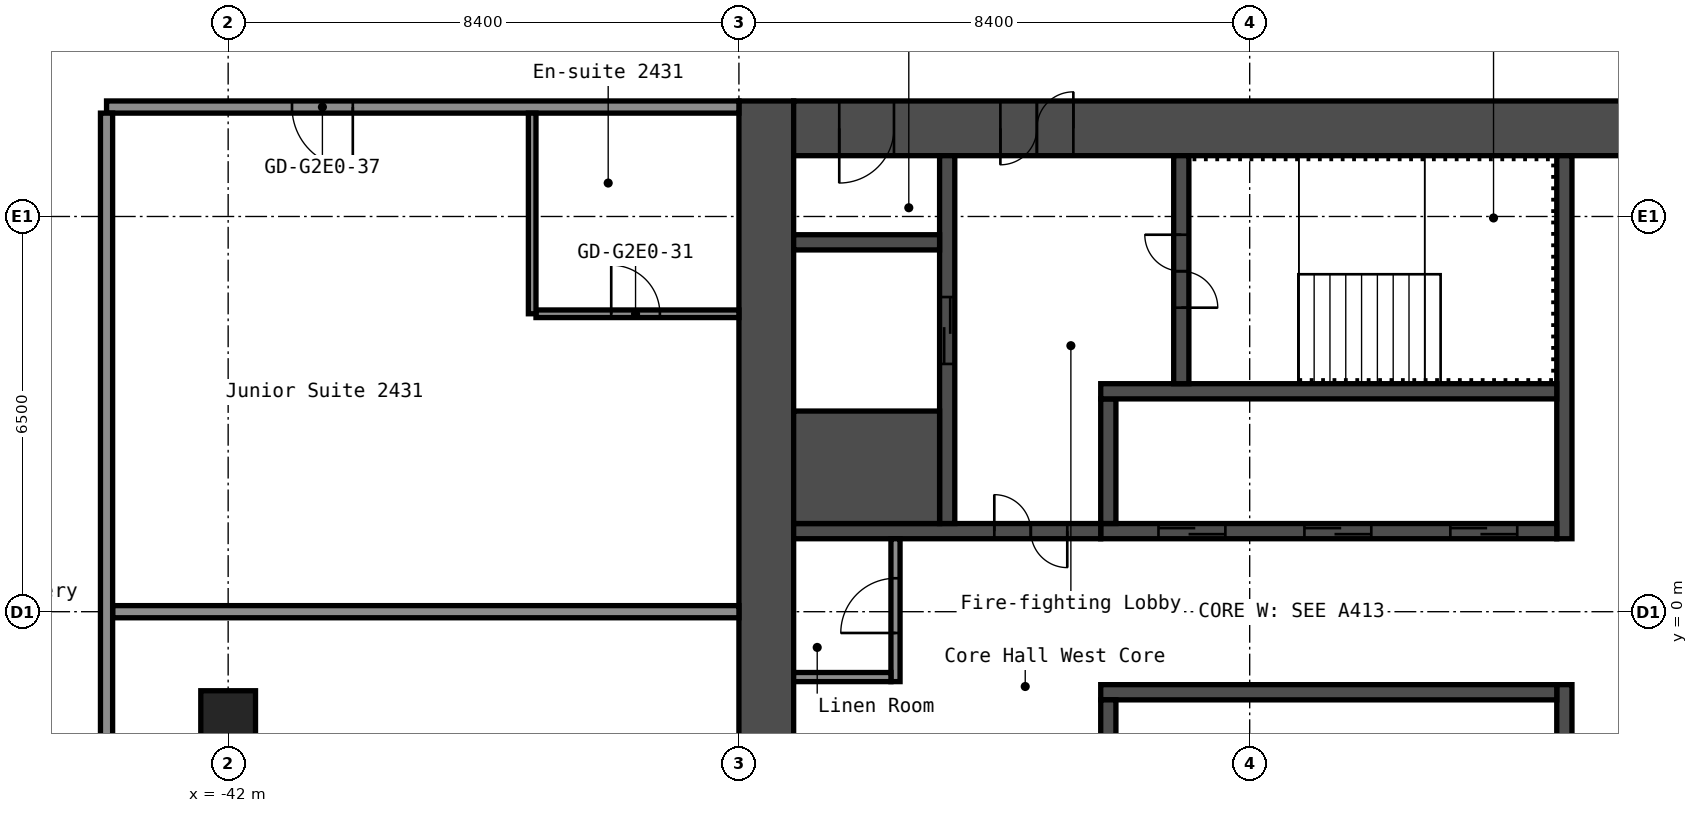
"""IFC4 building model, lengths in metres.
Left out: names, types, materials, properties, quantities, classifications, styles, units other than length and angle.
Written with IfcOpenShell. Run it as: python <this file> out.ifc"""

import sys

from ifc_helpers import new_model, si_unit, direction, frame, frame_2d, origin, origin_2d, place, context, subcontext, project, spatial, rectangle, hollow_rectangle, extrude, element, fill, save


model = new_model("IFC4")
c1 = context("Model", 3, precision=1e-05, world=origin(), true_north=direction((0.0, 1.0)))
c2 = subcontext(c1, "Body", "Model", "MODEL_VIEW")
j1 = project(units=[si_unit("LENGTHUNIT", "METRE"), si_unit("PLANEANGLEUNIT", "RADIAN")], contexts=[c1])
p1 = place(None, origin())
s1 = spatial("IfcSite", under=j1, at=p1, CompositionType="ELEMENT")
p2 = place(p1, origin())
s2 = spatial("IfcBuilding", under=s1, at=p2, CompositionType="ELEMENT")
p3 = place(p2, frame((0.0, 0.0, 88.2)))
s3 = spatial("IfcBuildingStorey", under=s2, at=p3, CompositionType="ELEMENT", Elevation=88.2)
p4 = place(p3, frame((-42.0, -1.75, 0.0), z_axis=(0.0, 0.0, 1.0), x_axis=(1.0, 0.0, 0.0)))
e1 = element("IfcColumn", 1, at=p4, inside=s3, PredefinedType="COLUMN", context=c2, shape_type="SweptSolid", body=[
    extrude(hollow_rectangle(XDim=0.9, YDim=0.9, WallThickness=0.036, at=origin_2d()), origin(), (0.0, 0.0, 1.0), 2.8),
])
p5 = place(p3, frame((-33.15, -8.4, 0.0), z_axis=(0.0, 0.0, 1.0), x_axis=(0.0, 1.0, 0.0)))
e2 = element("IfcWall", 2, at=p5, inside=s3, PredefinedType="SHEAR", context=c2, shape_type="SweptSolid", body=[
    extrude(rectangle(XDim=16.8, YDim=0.9, at=frame_2d((8.4, 0.0))), origin(), (0.0, 0.0, 1.0), 2.8),
])
p6 = place(p3, frame((-32.7, 7.95, 0.0), z_axis=(0.0, 0.0, 1.0), x_axis=(1.0, 0.0, 0.0)))
e3 = element("IfcWall", 3, at=p6, inside=s3, PredefinedType="SHEAR", context=c2, shape_type="SweptSolid", body=[
    extrude(rectangle(XDim=15.0, YDim=0.9, at=frame_2d((7.5, 0.0))), origin(), (0.0, 0.0, 1.0), 2.8),
])
p7 = place(p6, frame((3.4, 0.0, 0.0)))
e4 = element("IfcOpeningElement", 4, at=p7, cuts=e3, PredefinedType="OPENING", context=c2, shape_type="SweptSolid", body=[
    extrude(rectangle(XDim=1.2, YDim=2.1, at=frame_2d((0.6, 1.05))), frame((0.0, 0.46, 0.0), z_axis=(0.0, -1.0, 0.0), x_axis=(1.0, 0.0, 0.0)), (0.0, 0.0, 1.0), 0.92),
])
p8 = place(p6, frame((0.75, 0.0, 0.0)))
e5 = element("IfcOpeningElement", 5, at=p8, cuts=e3, PredefinedType="OPENING", context=c2, shape_type="SweptSolid", body=[
    extrude(rectangle(XDim=0.9, YDim=2.1, at=frame_2d((0.45, 1.05))), frame((0.0, 0.46, 0.0), z_axis=(0.0, -1.0, 0.0), x_axis=(1.0, 0.0, 0.0)), (0.0, 0.0, 1.0), 0.92),
])
p9 = place(p3, frame((-20.025, 1.2, 0.0), z_axis=(0.0, 0.0, 1.0), x_axis=(0.0, 1.0, 0.0)))
e6 = element("IfcWall", 6, at=p9, inside=s3, PredefinedType="SHEAR", context=c2, shape_type="SweptSolid", body=[
    extrude(rectangle(XDim=6.3, YDim=0.25, at=frame_2d((3.15, 0.0))), origin(), (0.0, 0.0, 1.0), 2.8),
])
p10 = place(p3, frame((-20.025, -7.5, 0.0), z_axis=(0.0, 0.0, 1.0), x_axis=(0.0, 1.0, 0.0)))
e7 = element("IfcWall", 7, at=p10, inside=s3, PredefinedType="SHEAR", context=c2, shape_type="SweptSolid", body=[
    extrude(rectangle(XDim=6.3, YDim=0.25, at=frame_2d((3.15, 0.0))), origin(), (0.0, 0.0, 1.0), 2.8),
])
p11 = place(p10, frame((2.4, 0.0, 0.0)))
e8 = element("IfcOpeningElement", 8, at=p11, cuts=e7, PredefinedType="OPENING", context=c2, shape_type="SweptSolid", body=[
    extrude(rectangle(XDim=1.0, YDim=2.1, at=frame_2d((0.5, 1.05))), frame((0.0, 0.135, 0.0), z_axis=(0.0, -1.0, 0.0), x_axis=(1.0, 0.0, 0.0)), (0.0, 0.0, 1.0), 0.27),
])
p12 = place(p3, frame((-27.65, 1.325, 0.0), z_axis=(0.0, 0.0, 1.0), x_axis=(1.0, 0.0, 0.0)))
e9 = element("IfcWall", 9, at=p12, inside=s3, PredefinedType="SHEAR", context=c2, shape_type="SweptSolid", body=[
    extrude(rectangle(XDim=7.5, YDim=0.25, at=frame_2d((3.75, 0.0))), origin(), (0.0, 0.0, 1.0), 2.8),
])
p13 = place(p12, frame((5.75, 0.0, 0.0)))
e10 = element("IfcOpeningElement", 10, at=p13, cuts=e9, PredefinedType="OPENING", context=c2, shape_type="SweptSolid", body=[
    extrude(rectangle(XDim=1.1, YDim=2.1, at=frame_2d((0.55, 1.05))), frame((0.0, 0.135, 0.0), z_axis=(0.0, -1.0, 0.0), x_axis=(1.0, 0.0, 0.0)), (0.0, 0.0, 1.0), 0.27),
])
p14 = place(p12, frame((3.35, 0.0, 0.0)))
e11 = element("IfcOpeningElement", 11, at=p14, cuts=e9, PredefinedType="OPENING", context=c2, shape_type="SweptSolid", body=[
    extrude(rectangle(XDim=1.1, YDim=2.1, at=frame_2d((0.55, 1.05))), frame((0.0, 0.135, 0.0), z_axis=(0.0, -1.0, 0.0), x_axis=(1.0, 0.0, 0.0)), (0.0, 0.0, 1.0), 0.27),
])
p15 = place(p12, frame((0.95, 0.0, 0.0)))
e12 = element("IfcOpeningElement", 12, at=p15, cuts=e9, PredefinedType="OPENING", context=c2, shape_type="SweptSolid", body=[
    extrude(rectangle(XDim=1.1, YDim=2.1, at=frame_2d((0.55, 1.05))), frame((0.0, 0.135, 0.0), z_axis=(0.0, -1.0, 0.0), x_axis=(1.0, 0.0, 0.0)), (0.0, 0.0, 1.0), 0.27),
])
p16 = place(p3, frame((-27.525, 1.45, 0.0), z_axis=(0.0, 0.0, 1.0), x_axis=(0.0, 1.0, 0.0)))
e13 = element("IfcWall", 13, at=p16, inside=s3, PredefinedType="SHEAR", context=c2, shape_type="SweptSolid", body=[
    extrude(rectangle(XDim=2.05, YDim=0.25, at=frame_2d((1.025, 0.0))), origin(), (0.0, 0.0, 1.0), 2.8),
])
p17 = place(p3, frame((-27.65, 3.625, 0.0), z_axis=(0.0, 0.0, 1.0), x_axis=(1.0, 0.0, 0.0)))
e14 = element("IfcWall", 14, at=p17, inside=s3, PredefinedType="SHEAR", context=c2, shape_type="SweptSolid", body=[
    extrude(rectangle(XDim=7.5, YDim=0.25, at=frame_2d((3.75, 0.0))), origin(), (0.0, 0.0, 1.0), 2.8),
])
p18 = place(p3, frame((-26.325, 3.75, 0.0), z_axis=(0.0, 0.0, 1.0), x_axis=(0.0, 1.0, 0.0)))
e15 = element("IfcWall", 15, at=p18, inside=s3, PredefinedType="SHEAR", context=c2, shape_type="SweptSolid", body=[
    extrude(rectangle(XDim=3.75, YDim=0.25, at=frame_2d((1.875, 0.0))), origin(), (0.0, 0.0, 1.0), 2.8),
])
p19 = place(p18, frame((1.25, 0.0, 0.0)))
e16 = element("IfcOpeningElement", 16, at=p19, cuts=e15, PredefinedType="OPENING", context=c2, shape_type="SweptSolid", body=[
    extrude(rectangle(XDim=1.2, YDim=2.1, at=frame_2d((0.6, 1.05))), frame((0.0, 0.135, 0.0), z_axis=(0.0, -1.0, 0.0), x_axis=(1.0, 0.0, 0.0)), (0.0, 0.0, 1.0), 0.27),
])
p20 = place(p3, frame((-32.7, 1.325, 0.0), z_axis=(0.0, 0.0, 1.0), x_axis=(1.0, 0.0, 0.0)))
e17 = element("IfcWall", 17, at=p20, inside=s3, PredefinedType="SHEAR", context=c2, shape_type="SweptSolid", body=[
    extrude(rectangle(XDim=5.05, YDim=0.25, at=frame_2d((2.525, 0.0))), origin(), (0.0, 0.0, 1.0), 2.8),
])
p21 = place(p20, frame((3.3, 0.0, 0.0)))
e18 = element("IfcOpeningElement", 18, at=p21, cuts=e17, PredefinedType="OPENING", context=c2, shape_type="SweptSolid", body=[
    extrude(rectangle(XDim=1.2, YDim=2.1, at=frame_2d((0.6, 1.05))), frame((0.0, 0.135, 0.0), z_axis=(0.0, -1.0, 0.0), x_axis=(1.0, 0.0, 0.0)), (0.0, 0.0, 1.0), 0.27),
])
p22 = place(p3, frame((-30.175, 1.45, 0.0), z_axis=(0.0, 0.0, 1.0), x_axis=(0.0, 1.0, 0.0)))
e19 = element("IfcWall", 19, at=p22, inside=s3, PredefinedType="SHEAR", context=c2, shape_type="SweptSolid", body=[
    extrude(rectangle(XDim=6.05, YDim=0.25, at=frame_2d((3.025, 0.0))), origin(), (0.0, 0.0, 1.0), 2.8),
])
p23 = place(p22, frame((2.625, 0.0, 0.0)))
e20 = element("IfcOpeningElement", 20, at=p23, cuts=e19, PredefinedType="OPENING", context=c2, shape_type="SweptSolid", body=[
    extrude(rectangle(XDim=1.1, YDim=2.1, at=frame_2d((0.55, 1.05))), frame((0.0, 0.135, 0.0), z_axis=(0.0, -1.0, 0.0), x_axis=(1.0, 0.0, 0.0)), (0.0, 0.0, 1.0), 0.27),
])
p24 = place(p3, frame((-32.7, 2.375, 0.0), z_axis=(0.0, 0.0, 1.0), x_axis=(1.0, 0.0, 0.0)))
e21 = element("IfcWall", 21, at=p24, inside=s3, PredefinedType="SHEAR", context=c2, shape_type="SweptSolid", body=[
    extrude(rectangle(XDim=2.4, YDim=1.85, at=frame_2d((1.2, 0.0))), origin(), (0.0, 0.0, 1.0), 2.8),
])
p25 = place(p3, frame((-32.7, 6.075, 0.0), z_axis=(0.0, 0.0, 1.0), x_axis=(1.0, 0.0, 0.0)))
e22 = element("IfcWall", 22, at=p25, inside=s3, PredefinedType="SHEAR", context=c2, shape_type="SweptSolid", body=[
    extrude(rectangle(XDim=2.4, YDim=0.25, at=frame_2d((1.2, 0.0))), origin(), (0.0, 0.0, 1.0), 2.8),
])
p26 = place(p3, frame((-27.65, -1.325, 0.0), z_axis=(0.0, 0.0, 1.0), x_axis=(1.0, 0.0, 0.0)))
e23 = element("IfcWall", 23, at=p26, inside=s3, PredefinedType="SHEAR", context=c2, shape_type="SweptSolid", body=[
    extrude(rectangle(XDim=7.5, YDim=0.25, at=frame_2d((3.75, 0.0))), origin(), (0.0, 0.0, 1.0), 2.8),
])
p27 = place(p3, frame((-27.525, -3.5, 0.0), z_axis=(0.0, 0.0, 1.0), x_axis=(0.0, 1.0, 0.0)))
e24 = element("IfcWall", 24, at=p27, inside=s3, PredefinedType="SHEAR", context=c2, shape_type="SweptSolid", body=[
    extrude(rectangle(XDim=2.05, YDim=0.25, at=frame_2d((1.025, 0.0))), origin(), (0.0, 0.0, 1.0), 2.8),
])
p28 = place(p3, frame((-31.025, -1.15, 0.0), z_axis=(0.0, 0.0, 1.0), x_axis=(0.0, 1.0, 0.0)))
e25 = element("IfcWall", 25, at=p28, inside=s3, PredefinedType="PARTITIONING", context=c2, shape_type="SweptSolid", body=[
    extrude(rectangle(XDim=2.35, YDim=0.15, at=frame_2d((1.175, 0.0))), origin(), (0.0, 0.0, 1.0), 2.8),
])
p29 = place(p28, frame((0.8, 0.0, 0.0)))
e26 = element("IfcOpeningElement", 26, at=p29, cuts=e25, PredefinedType="OPENING", context=c2, shape_type="SweptSolid", body=[
    extrude(rectangle(XDim=0.9, YDim=2.1, at=frame_2d((0.45, 1.05))), frame((0.0, 0.085, 0.0), z_axis=(0.0, -1.0, 0.0), x_axis=(1.0, 0.0, 0.0)), (0.0, 0.0, 1.0), 0.17),
])
p30 = place(p3, frame((-32.7, -1.075, 0.0), z_axis=(0.0, 0.0, 1.0), x_axis=(1.0, 0.0, 0.0)))
e27 = element("IfcWall", 27, at=p30, inside=s3, PredefinedType="PARTITIONING", context=c2, shape_type="SweptSolid", body=[
    extrude(rectangle(XDim=1.6, YDim=0.15, at=frame_2d((0.8, 0.0))), origin(), (0.0, 0.0, 1.0), 2.8),
])
p31 = place(p3, frame((-43.9, 0.0, 0.0), z_axis=(0.0, 0.0, 1.0), x_axis=(1.0, 0.0, 0.0)))
e28 = element("IfcWall", 28, at=p31, inside=s3, PredefinedType="PARTITIONING", context=c2, shape_type="SweptSolid", body=[
    extrude(rectangle(XDim=10.3, YDim=0.2, at=frame_2d((5.15, 0.0))), origin(), (0.0, 0.0, 1.0), 2.8),
])
p32 = place(p3, frame((-36.938, 4.9, 0.0), z_axis=(0.0, 0.0, 1.0), x_axis=(1.0, 0.0, 0.0)))
e29 = element("IfcWall", 29, at=p32, inside=s3, PredefinedType="PARTITIONING", context=c2, shape_type="SweptSolid", body=[
    extrude(rectangle(XDim=3.337, YDim=0.125, at=frame_2d((1.669, 0.0))), origin(), (0.0, 0.0, 1.0), 2.8),
])
p33 = place(p32, frame((1.238, 0.0, 0.0)))
e30 = element("IfcOpeningElement", 30, at=p33, cuts=e29, PredefinedType="OPENING", context=c2, shape_type="SweptSolid", body=[
    extrude(rectangle(XDim=0.8, YDim=2.1, at=frame_2d((0.4, 1.05))), frame((0.0, 0.073, 0.0), z_axis=(0.0, -1.0, 0.0), x_axis=(1.0, 0.0, 0.0)), (0.0, 0.0, 1.0), 0.145),
])
p34 = place(p3, frame((-44.0, 8.3, 0.0), z_axis=(0.0, 0.0, 1.0), x_axis=(1.0, 0.0, 0.0)))
e31 = element("IfcWall", 31, at=p34, inside=s3, PredefinedType="PARTITIONING", context=c2, shape_type="SweptSolid", body=[
    extrude(rectangle(XDim=10.4, YDim=0.2, at=frame_2d((5.2, 0.0))), origin(), (0.0, 0.0, 1.0), 2.8),
])
p35 = place(p34, frame((3.05, 0.0, 0.0)))
e32 = element("IfcOpeningElement", 32, at=p35, cuts=e31, PredefinedType="OPENING", context=c2, shape_type="SweptSolid", body=[
    extrude(rectangle(XDim=1.0, YDim=2.1, at=frame_2d((0.5, 1.05))), frame((0.0, 0.11, 0.0), z_axis=(0.0, -1.0, 0.0), x_axis=(1.0, 0.0, 0.0)), (0.0, 0.0, 1.0), 0.22),
])
p36 = place(p3, frame((-44.0, -8.2, 0.0), z_axis=(0.0, 0.0, 1.0), x_axis=(0.0, 1.0, 0.0)))
e33 = element("IfcWall", 33, at=p36, inside=s3, PredefinedType="PARTITIONING", context=c2, shape_type="SweptSolid", body=[
    extrude(rectangle(XDim=16.4, YDim=0.2, at=frame_2d((8.2, 0.0))), origin(), (0.0, 0.0, 1.0), 2.8),
])
p37 = place(p3, frame((-37.0, 4.9, 0.0), z_axis=(0.0, 0.0, 1.0), x_axis=(0.0, 1.0, 0.0)))
e34 = element("IfcWall", 34, at=p37, inside=s3, PredefinedType="PARTITIONING", context=c2, shape_type="SweptSolid", body=[
    extrude(rectangle(XDim=3.3, YDim=0.125, at=frame_2d((1.65, 0.0))), origin(), (0.0, 0.0, 1.0), 2.8),
])
p38 = place(p7, origin())
e35 = element("IfcDoor", 35, at=p38, inside=s3, OperationType="DOUBLE_DOOR_SINGLE_SWING", PredefinedType="DOOR", context=c2, shape_type="SweptSolid", body=[
    extrude(rectangle(XDim=1.2, YDim=2.1, at=frame_2d((0.6, 1.05))), frame((0.0, 0.025, 0.0), z_axis=(0.0, -1.0, 0.0), x_axis=(1.0, 0.0, 0.0)), (0.0, 0.0, 1.0), 0.05),
])
fill(e4, e35)
p39 = place(p8, origin())
e36 = element("IfcDoor", 36, at=p39, inside=s3, OperationType="SINGLE_SWING_LEFT", PredefinedType="DOOR", context=c2, shape_type="SweptSolid", body=[
    extrude(rectangle(XDim=0.9, YDim=2.1, at=frame_2d((0.45, 1.05))), frame((0.0, 0.025, 0.0), z_axis=(0.0, -1.0, 0.0), x_axis=(1.0, 0.0, 0.0)), (0.0, 0.0, 1.0), 0.05),
])
fill(e5, e36)
p40 = place(p19, origin())
e37 = element("IfcDoor", 37, at=p40, inside=s3, OperationType="DOUBLE_DOOR_SINGLE_SWING", PredefinedType="DOOR", context=c2, shape_type="SweptSolid", body=[
    extrude(rectangle(XDim=1.2, YDim=2.1, at=frame_2d((0.6, 1.05))), frame((0.0, 0.025, 0.0), z_axis=(0.0, -1.0, 0.0), x_axis=(1.0, 0.0, 0.0)), (0.0, 0.0, 1.0), 0.05),
])
fill(e16, e37)
p41 = place(p21, origin())
e38 = element("IfcDoor", 38, at=p41, inside=s3, OperationType="DOUBLE_DOOR_SINGLE_SWING", PredefinedType="DOOR", context=c2, shape_type="SweptSolid", body=[
    extrude(rectangle(XDim=1.2, YDim=2.1, at=frame_2d((0.6, 1.05))), frame((0.0, 0.025, 0.0), z_axis=(0.0, -1.0, 0.0), x_axis=(1.0, 0.0, 0.0)), (0.0, 0.0, 1.0), 0.05),
])
fill(e18, e38)
p42 = place(p29, origin())
e39 = element("IfcDoor", 39, at=p42, inside=s3, OperationType="SINGLE_SWING_RIGHT", PredefinedType="DOOR", context=c2, shape_type="SweptSolid", body=[
    extrude(rectangle(XDim=0.9, YDim=2.1, at=frame_2d((0.45, 1.05))), frame((0.0, 0.025, 0.0), z_axis=(0.0, -1.0, 0.0), x_axis=(1.0, 0.0, 0.0)), (0.0, 0.0, 1.0), 0.05),
])
fill(e26, e39)
p43 = place(p13, origin())
e40 = element("IfcDoor", 40, at=p43, inside=s3, OperationType="DOUBLE_DOOR_SLIDING", PredefinedType="DOOR", context=c2, shape_type="SweptSolid", body=[
    extrude(rectangle(XDim=1.1, YDim=2.1, at=frame_2d((0.55, 1.05))), frame((0.0, 0.025, 0.0), z_axis=(0.0, -1.0, 0.0), x_axis=(1.0, 0.0, 0.0)), (0.0, 0.0, 1.0), 0.05),
])
fill(e10, e40)
p44 = place(p14, origin())
e41 = element("IfcDoor", 41, at=p44, inside=s3, OperationType="DOUBLE_DOOR_SLIDING", PredefinedType="DOOR", context=c2, shape_type="SweptSolid", body=[
    extrude(rectangle(XDim=1.1, YDim=2.1, at=frame_2d((0.55, 1.05))), frame((0.0, 0.025, 0.0), z_axis=(0.0, -1.0, 0.0), x_axis=(1.0, 0.0, 0.0)), (0.0, 0.0, 1.0), 0.05),
])
fill(e11, e41)
p45 = place(p15, origin())
e42 = element("IfcDoor", 42, at=p45, inside=s3, OperationType="DOUBLE_DOOR_SLIDING", PredefinedType="DOOR", context=c2, shape_type="SweptSolid", body=[
    extrude(rectangle(XDim=1.1, YDim=2.1, at=frame_2d((0.55, 1.05))), frame((0.0, 0.025, 0.0), z_axis=(0.0, -1.0, 0.0), x_axis=(1.0, 0.0, 0.0)), (0.0, 0.0, 1.0), 0.05),
])
fill(e12, e42)
p46 = place(p23, origin())
e43 = element("IfcDoor", 43, at=p46, inside=s3, OperationType="DOUBLE_DOOR_SLIDING", PredefinedType="DOOR", context=c2, shape_type="SweptSolid", body=[
    extrude(rectangle(XDim=1.1, YDim=2.1, at=frame_2d((0.55, 1.05))), frame((0.0, 0.025, 0.0), z_axis=(0.0, -1.0, 0.0), x_axis=(1.0, 0.0, 0.0)), (0.0, 0.0, 1.0), 0.05),
])
fill(e20, e43)
p47 = place(p33, origin())
e44 = element("IfcDoor", 44, at=p47, inside=s3, OperationType="SINGLE_SWING_RIGHT", PredefinedType="DOOR", context=c2, shape_type="SweptSolid", body=[
    extrude(rectangle(XDim=0.8, YDim=2.1, at=frame_2d((0.4, 1.05))), frame((0.0, 0.025, 0.0), z_axis=(0.0, -1.0, 0.0), x_axis=(1.0, 0.0, 0.0)), (0.0, 0.0, 1.0), 0.05),
])
fill(e30, e44)
p48 = place(p35, origin())
e45 = element("IfcDoor", 45, at=p48, inside=s3, OperationType="SINGLE_SWING_RIGHT", PredefinedType="DOOR", context=c2, shape_type="SweptSolid", body=[
    extrude(rectangle(XDim=1.0, YDim=2.1, at=frame_2d((0.5, 1.05))), frame((0.0, 0.025, 0.0), z_axis=(0.0, -1.0, 0.0), x_axis=(1.0, 0.0, 0.0)), (0.0, 0.0, 1.0), 0.05),
])
fill(e32, e45)
save(model, sys.argv[1])
